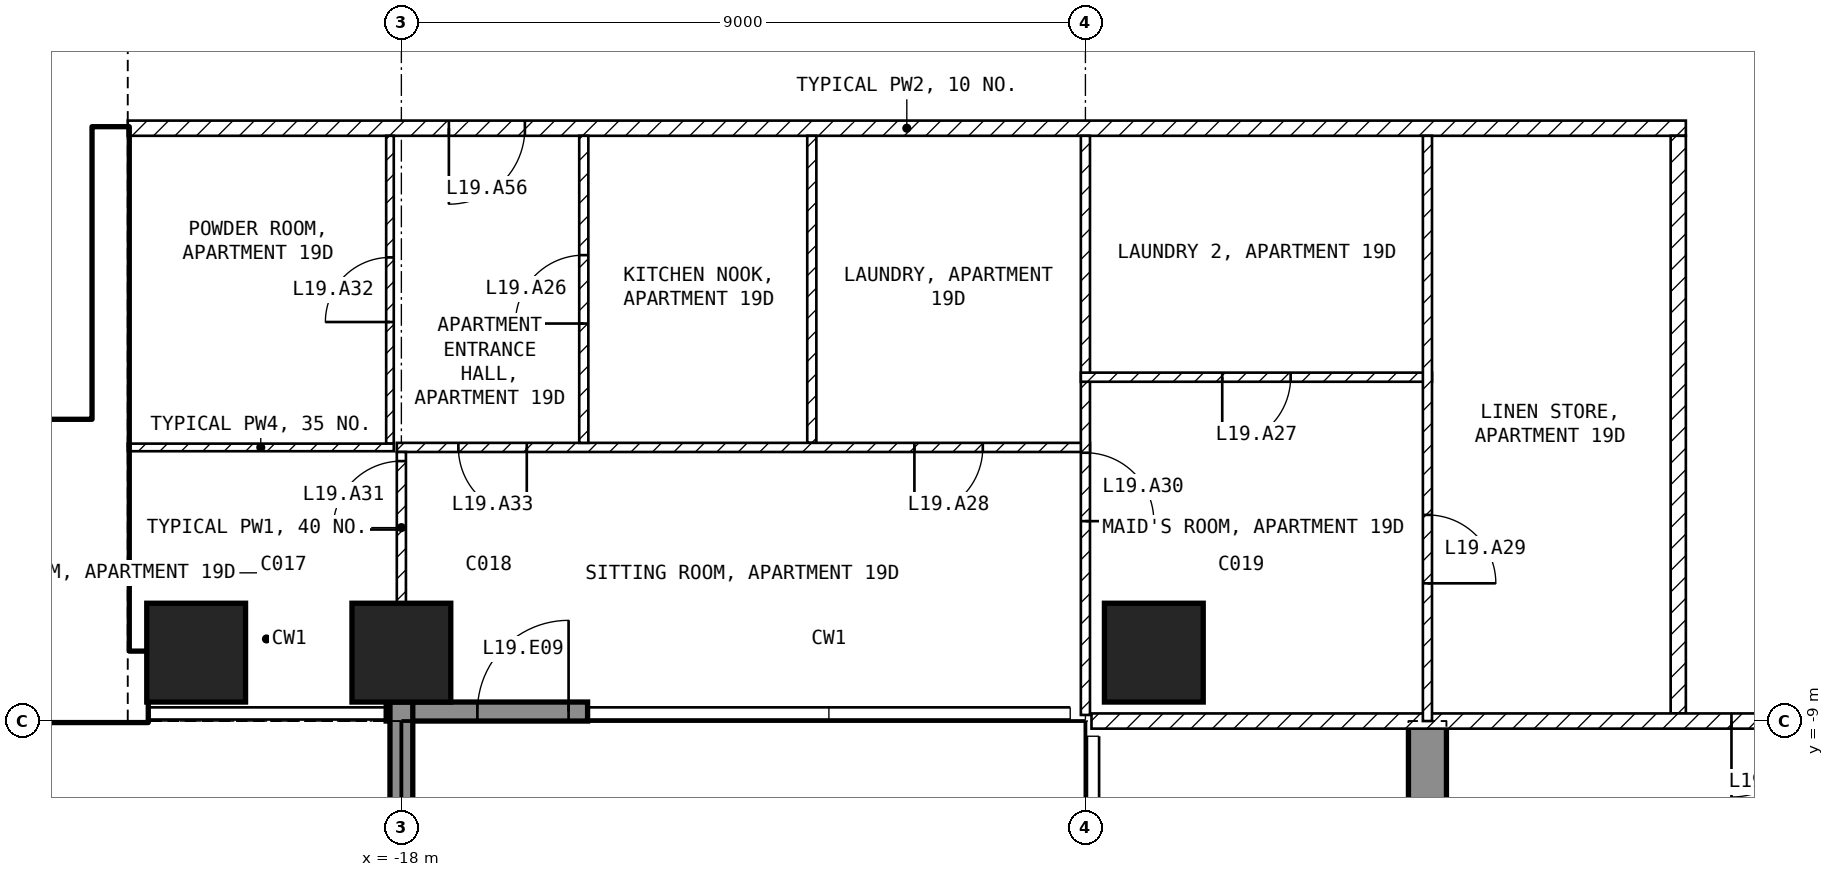
"""IFC4 building model, lengths in metres.
Left out: names, types, materials, properties, quantities, classifications, styles, units other than length and angle.
Written with IfcOpenShell. Run it as: python <this file> out.ifc"""

import sys

from ifc_helpers import new_model, si_unit, direction, frame, frame_2d, origin, origin_2d, place, context, subcontext, project, spatial, polyline, rectangle, outline, extrude, element, fill, save


model = new_model("IFC4")
c1 = context("Model", 3, precision=1e-05, world=origin(), true_north=direction((0.0, 1.0)))
c2 = subcontext(c1, "Body", "Model", "MODEL_VIEW")
j1 = project(units=[si_unit("LENGTHUNIT", "METRE"), si_unit("PLANEANGLEUNIT", "RADIAN")], contexts=[c1])
p1 = place(None, origin())
s1 = spatial("IfcSite", under=j1, at=p1, CompositionType="ELEMENT")
p2 = place(p1, origin())
s2 = spatial("IfcBuilding", under=s1, at=p2, CompositionType="ELEMENT")
p3 = place(p2, frame((0.0, 0.0, 85.5)))
s3 = spatial("IfcBuildingStorey", under=s2, at=p3, CompositionType="ELEMENT", Elevation=85.5)
for number, where, z_axis, x_axis in (
    (1, (-20.7, -8.1, -0.25), (0.0, 0.0, 1.0), (1.0, 0.0, 0.0)),
    (2, (-18.0, -8.1, -0.25), (0.0, 0.0, 1.0), (1.0, 0.0, 0.0)),
    (3, (-8.1, -8.1, -0.25), (0.0, 0.0, 1.0), (1.0, 0.0, 0.0)),
):
    element("IfcColumn", number, at=place(p3, frame(where, z_axis=z_axis, x_axis=x_axis)), inside=s3, PredefinedType="COLUMN", context=c2, shape_type="SweptSolid", body=[
        extrude(rectangle(XDim=1.3, YDim=1.3, at=origin_2d()), origin(), (0.0, 0.0, 1.0), 3.5),
    ])
p4 = place(p3, frame((-4.75, -25.45, -0.25), z_axis=(1.0, 0.0, 0.0), x_axis=(0.0, 1.0, 0.0)))
e4 = element("IfcWall", 4, at=p4, inside=s3, PredefinedType="SHEAR", context=c2, shape_type="SweptSolid", body=[
    extrude(outline(polyline([(0.0, 0.0), (4.15, 0.0), (4.15, 2.65), (6.55, 2.65), (6.55, 0.0), (11.95, 0.0), (11.95, 2.65), (14.35, 2.65), (14.35, 0.0), (16.45, 0.0), (16.45, 3.5), (0.0, 3.5), (0.0, 0.0)])), origin(), (0.0, 0.0, 1.0), 0.5),
])
p5 = place(p3, frame((-18.2, -8.875, 0.0), z_axis=(0.0, 0.0, 1.0), x_axis=(1.0, 0.0, 0.0)))
e5 = element("IfcWall", 5, at=p5, inside=s3, PredefinedType="SOLIDWALL", context=c2, shape_type="SweptSolid", body=[
    extrude(rectangle(XDim=2.65, YDim=0.25, at=frame_2d((1.325, 0.0))), origin(), (0.0, 0.0, 1.0), 3.25),
])
p6 = place(p5, frame((1.2, 0.0, 0.0)))
e6 = element("IfcOpeningElement", 6, at=p6, cuts=e5, PredefinedType="OPENING", context=c2, shape_type="SweptSolid", body=[
    extrude(rectangle(XDim=1.2, YDim=2.4, at=frame_2d((0.6, 1.2))), frame((0.0, 0.135, 0.0), z_axis=(0.0, -1.0, 0.0), x_axis=(1.0, 0.0, 0.0)), (0.0, 0.0, 1.0), 0.27),
])
p7 = place(p3, frame((-18.0, -8.75, 0.0), z_axis=(0.0, 0.0, 1.0), x_axis=(0.0, -1.0, 0.0)))
e7 = element("IfcWall", 7, at=p7, inside=s3, PredefinedType="SOLIDWALL", context=c2, shape_type="SweptSolid", body=[
    extrude(rectangle(XDim=2.95, YDim=0.3, at=frame_2d((1.475, 0.0))), origin(), (0.0, 0.0, 1.0), 3.25),
])
p8 = place(p3, frame((-32.4, -8.55, 0.0), z_axis=(0.0, 0.0, 1.0), x_axis=(1.0, 0.0, 0.0)))
e8 = element("IfcWall", 8, at=p8, inside=s3, PredefinedType="SHEAR", context=c2, shape_type="SweptSolid", body=[
    extrude(rectangle(XDim=11.05, YDim=0.9, at=frame_2d((5.525, 0.0))), origin(), (0.0, 0.0, 1.0), 3.25),
])
p9 = place(p3, frame((-21.825, -8.1, 0.0), z_axis=(0.0, 0.0, 1.0), x_axis=(0.0, 1.0, 0.0)))
e9 = element("IfcWall", 9, at=p9, inside=s3, PredefinedType="SHEAR", context=c2, shape_type="SweptSolid", body=[
    extrude(rectangle(XDim=6.9, YDim=0.45, at=frame_2d((3.45, 0.0))), origin(), (0.0, 0.0, 1.0), 3.25),
])
p10 = place(p3, frame((-28.35, -5.15, 0.0), z_axis=(0.0, 0.0, 1.0), x_axis=(1.0, 0.0, 0.0)))
e10 = element("IfcWall", 10, at=p10, inside=s3, PredefinedType="SOLIDWALL", context=c2, shape_type="SweptSolid", body=[
    extrude(rectangle(XDim=6.3, YDim=0.2, at=frame_2d((3.15, 0.0))), origin(), (0.0, 0.0, 1.0), 3.25),
])
p11 = place(p10, frame((5.1, 0.0, 0.0)))
e11 = element("IfcOpeningElement", 11, at=p11, cuts=e10, PredefinedType="OPENING", context=c2, shape_type="SweptSolid", body=[
    extrude(rectangle(XDim=1.0, YDim=2.1, at=frame_2d((0.5, 1.05))), frame((0.0, 0.11, 0.0), z_axis=(0.0, -1.0, 0.0), x_axis=(1.0, 0.0, 0.0)), (0.0, 0.0, 1.0), 0.22),
])
p12 = place(p3, frame((-1.1, -1.2, 0.0), z_axis=(0.0, 0.0, 1.0), x_axis=(-1.0, 0.0, 0.0)))
e12 = element("IfcWall", 12, at=p12, inside=s3, PredefinedType="PARTITIONING", context=c2, shape_type="SweptSolid", body=[
    extrude(rectangle(XDim=20.5, YDim=0.2, at=frame_2d((10.25, 0.0))), origin(), (0.0, 0.0, 1.0), 3.25),
])
p13 = place(p12, frame((15.275, 0.0, 0.0)))
e13 = element("IfcOpeningElement", 13, at=p13, cuts=e12, PredefinedType="OPENING", context=c2, shape_type="SweptSolid", body=[
    extrude(rectangle(XDim=1.0, YDim=2.1, at=frame_2d((0.5, 1.05))), frame((0.0, 0.11, 0.0), z_axis=(0.0, -1.0, 0.0), x_axis=(1.0, 0.0, 0.0)), (0.0, 0.0, 1.0), 0.22),
])
p14 = place(p3, frame((-1.2, -8.9, 0.0), z_axis=(0.0, 0.0, 1.0), x_axis=(0.0, 1.0, 0.0)))
e14 = element("IfcWall", 14, at=p14, inside=s3, PredefinedType="PARTITIONING", context=c2, shape_type="SweptSolid", body=[
    extrude(rectangle(XDim=7.6, YDim=0.2, at=frame_2d((3.8, 0.0))), origin(), (0.0, 0.0, 1.0), 3.25),
])
p15 = place(p3, frame((8.92, -9.0, 0.0), z_axis=(0.0, 0.0, 1.0), x_axis=(-1.0, 0.0, 0.0)))
e15 = element("IfcWall", 15, at=p15, inside=s3, PredefinedType="PARTITIONING", context=c2, shape_type="SweptSolid", body=[
    extrude(rectangle(XDim=17.84, YDim=0.2, at=frame_2d((8.92, 0.0))), origin(), (0.0, 0.0, 1.0), 3.25),
])
p16 = place(p15, frame((8.42, 0.0, 0.0)))
e16 = element("IfcOpeningElement", 16, at=p16, cuts=e15, PredefinedType="OPENING", context=c2, shape_type="SweptSolid", body=[
    extrude(rectangle(XDim=1.0, YDim=2.1, at=frame_2d((0.5, 1.05))), frame((0.0, 0.11, 0.0), z_axis=(0.0, -1.0, 0.0), x_axis=(1.0, 0.0, 0.0)), (0.0, 0.0, 1.0), 0.22),
])
p17 = place(p3, frame((-12.6, -5.34, 0.0), z_axis=(0.0, 0.0, 1.0), x_axis=(0.0, 1.0, 0.0)))
e17 = element("IfcWall", 17, at=p17, inside=s3, PredefinedType="PARTITIONING", context=c2, shape_type="SweptSolid", body=[
    extrude(rectangle(XDim=4.04, YDim=0.12, at=frame_2d((2.02, 0.0))), origin(), (0.0, 0.0, 1.0), 3.25),
])
p18 = place(p3, frame((-8.94, -5.4, 0.0), z_axis=(0.0, 0.0, 1.0), x_axis=(-1.0, 0.0, 0.0)))
e18 = element("IfcWall", 18, at=p18, inside=s3, PredefinedType="PARTITIONING", context=c2, shape_type="SweptSolid", body=[
    extrude(rectangle(XDim=9.12, YDim=0.12, at=frame_2d((4.56, 0.0))), origin(), (0.0, 0.0, 1.0), 3.25),
])
p19 = place(p18, frame((1.41, 0.0, 0.0)))
e19 = element("IfcOpeningElement", 19, at=p19, cuts=e18, PredefinedType="OPENING", context=c2, shape_type="SweptSolid", body=[
    extrude(rectangle(XDim=0.9, YDim=2.1, at=frame_2d((0.45, 1.05))), frame((0.0, 0.07, 0.0), z_axis=(0.0, -1.0, 0.0), x_axis=(1.0, 0.0, 0.0)), (0.0, 0.0, 1.0), 0.14),
])
p20 = place(p18, frame((7.41, 0.0, 0.0)))
e20 = element("IfcOpeningElement", 20, at=p20, cuts=e18, PredefinedType="OPENING", context=c2, shape_type="SweptSolid", body=[
    extrude(rectangle(XDim=0.9, YDim=2.1, at=frame_2d((0.45, 1.05))), frame((0.0, 0.07, 0.0), z_axis=(0.0, -1.0, 0.0), x_axis=(1.0, 0.0, 0.0)), (0.0, 0.0, 1.0), 0.14),
])
p21 = place(p3, frame((-9.0, -1.3, 0.0), z_axis=(0.0, 0.0, 1.0), x_axis=(0.0, -1.0, 0.0)))
e21 = element("IfcWall", 21, at=p21, inside=s3, PredefinedType="PARTITIONING", context=c2, shape_type="SweptSolid", body=[
    extrude(rectangle(XDim=7.62, YDim=0.12, at=frame_2d((3.81, 0.0))), origin(), (0.0, 0.0, 1.0), 3.25),
])
p22 = place(p21, frame((4.17, 0.0, 0.0)))
e22 = element("IfcOpeningElement", 22, at=p22, cuts=e21, PredefinedType="OPENING", context=c2, shape_type="SweptSolid", body=[
    extrude(rectangle(XDim=0.9, YDim=2.1, at=frame_2d((0.45, 1.05))), frame((0.0, 0.07, 0.0), z_axis=(0.0, -1.0, 0.0), x_axis=(1.0, 0.0, 0.0)), (0.0, 0.0, 1.0), 0.14),
])
p23 = place(p3, frame((-15.6, -5.34, 0.0), z_axis=(0.0, 0.0, 1.0), x_axis=(0.0, 1.0, 0.0)))
e23 = element("IfcWall", 23, at=p23, inside=s3, PredefinedType="PARTITIONING", context=c2, shape_type="SweptSolid", body=[
    extrude(rectangle(XDim=4.04, YDim=0.12, at=frame_2d((2.02, 0.0))), origin(), (0.0, 0.0, 1.0), 3.25),
])
p24 = place(p23, frame((1.57, 0.0, 0.0)))
e24 = element("IfcOpeningElement", 24, at=p24, cuts=e23, PredefinedType="OPENING", context=c2, shape_type="SweptSolid", body=[
    extrude(rectangle(XDim=0.9, YDim=2.1, at=frame_2d((0.45, 1.05))), frame((0.0, 0.07, 0.0), z_axis=(0.0, -1.0, 0.0), x_axis=(1.0, 0.0, 0.0)), (0.0, 0.0, 1.0), 0.14),
])
p25 = place(p3, frame((-18.15, -5.35, 0.0), z_axis=(0.0, 0.0, 1.0), x_axis=(0.0, 1.0, 0.0)))
e25 = element("IfcWall", 25, at=p25, inside=s3, PredefinedType="PARTITIONING", context=c2, shape_type="SweptSolid", body=[
    extrude(rectangle(XDim=4.05, YDim=0.1, at=frame_2d((2.025, 0.0))), origin(), (0.0, 0.0, 1.0), 2.346),
])
p26 = place(p25, frame((1.6, 0.0, 0.0)))
e26 = element("IfcOpeningElement", 26, at=p26, cuts=e25, PredefinedType="OPENING", context=c2, shape_type="SweptSolid", body=[
    extrude(rectangle(XDim=0.85, YDim=2.1, at=frame_2d((0.425, 1.05))), frame((0.0, 0.06, 0.0), z_axis=(0.0, -1.0, 0.0), x_axis=(1.0, 0.0, 0.0)), (0.0, 0.0, 1.0), 0.12),
])
p27 = place(p3, frame((-18.1, -5.4, 0.0), z_axis=(0.0, 0.0, 1.0), x_axis=(-1.0, 0.0, 0.0)))
e27 = element("IfcWall", 27, at=p27, inside=s3, PredefinedType="PARTITIONING", context=c2, shape_type="SweptSolid", body=[
    extrude(rectangle(XDim=3.5, YDim=0.1, at=frame_2d((1.75, 0.0))), origin(), (0.0, 0.0, 1.0), 3.25),
])
p28 = place(p3, frame((-18.0, -7.45, 0.0), z_axis=(0.0, 0.0, 1.0), x_axis=(0.0, 1.0, 0.0)))
e28 = element("IfcWall", 28, at=p28, inside=s3, PredefinedType="PARTITIONING", context=c2, shape_type="SweptSolid", body=[
    extrude(rectangle(XDim=1.99, YDim=0.12, at=frame_2d((0.995, 0.0))), origin(), (0.0, 0.0, 1.0), 2.346),
])
p29 = place(p28, frame((0.97, 0.0, 0.0)))
e29 = element("IfcOpeningElement", 29, at=p29, cuts=e28, PredefinedType="OPENING", context=c2, shape_type="SweptSolid", body=[
    extrude(rectangle(XDim=0.9, YDim=2.1, at=frame_2d((0.45, 1.05))), frame((0.0, 0.07, 0.0), z_axis=(0.0, -1.0, 0.0), x_axis=(1.0, 0.0, 0.0)), (0.0, 0.0, 1.0), 0.14),
])
p30 = place(p3, frame((-4.44, -4.476, 0.0), z_axis=(0.0, 0.0, 1.0), x_axis=(-1.0, 0.0, 0.0)))
e30 = element("IfcWall", 30, at=p30, inside=s3, PredefinedType="PARTITIONING", context=c2, shape_type="SweptSolid", body=[
    extrude(rectangle(XDim=4.62, YDim=0.12, at=frame_2d((2.31, 0.0))), origin(), (0.0, 0.0, 1.0), 3.25),
])
p31 = place(p30, frame((1.86, 0.0, 0.0)))
e31 = element("IfcOpeningElement", 31, at=p31, cuts=e30, PredefinedType="OPENING", context=c2, shape_type="SweptSolid", body=[
    extrude(rectangle(XDim=0.9, YDim=2.1, at=frame_2d((0.45, 1.05))), frame((0.0, 0.07, 0.0), z_axis=(0.0, -1.0, 0.0), x_axis=(1.0, 0.0, 0.0)), (0.0, 0.0, 1.0), 0.14),
])
p32 = place(p3, frame((-4.5, -1.3, 0.0), z_axis=(0.0, 0.0, 1.0), x_axis=(0.0, -1.0, 0.0)))
e32 = element("IfcWall", 32, at=p32, inside=s3, PredefinedType="PARTITIONING", context=c2, shape_type="SweptSolid", body=[
    extrude(rectangle(XDim=7.7, YDim=0.12, at=frame_2d((3.85, 0.0))), origin(), (0.0, 0.0, 1.0), 3.25),
])
p33 = place(p32, frame((4.988, 0.0, 0.0)))
e33 = element("IfcOpeningElement", 33, at=p33, cuts=e32, PredefinedType="OPENING", context=c2, shape_type="SweptSolid", body=[
    extrude(rectangle(XDim=0.9, YDim=2.1, at=frame_2d((0.45, 1.05))), frame((0.0, 0.07, 0.0), z_axis=(0.0, -1.0, 0.0), x_axis=(1.0, 0.0, 0.0)), (0.0, 0.0, 1.0), 0.14),
])
p34 = place(p6, origin())
e34 = element("IfcDoor", 34, at=p34, inside=s3, OperationType="SINGLE_SWING_RIGHT", PredefinedType="DOOR", context=c2, shape_type="SweptSolid", body=[
    extrude(rectangle(XDim=1.2, YDim=2.4, at=frame_2d((0.6, 1.2))), frame((0.0, 0.025, 0.0), z_axis=(0.0, -1.0, 0.0), x_axis=(1.0, 0.0, 0.0)), (0.0, 0.0, 1.0), 0.05),
])
fill(e6, e34)
p35 = place(p11, origin())
e35 = element("IfcDoor", 35, at=p35, inside=s3, OperationType="SINGLE_SWING_LEFT", PredefinedType="DOOR", context=c2, shape_type="SweptSolid", body=[
    extrude(rectangle(XDim=1.0, YDim=2.1, at=frame_2d((0.5, 1.05))), frame((0.0, 0.025, 0.0), z_axis=(0.0, -1.0, 0.0), x_axis=(1.0, 0.0, 0.0)), (0.0, 0.0, 1.0), 0.05),
])
fill(e11, e35)
p36 = place(p24, origin())
e36 = element("IfcDoor", 36, at=p36, inside=s3, OperationType="SINGLE_SWING_LEFT", PredefinedType="DOOR", context=c2, shape_type="SweptSolid", body=[
    extrude(rectangle(XDim=0.9, YDim=2.1, at=frame_2d((0.45, 1.05))), frame((0.0, 0.025, 0.0), z_axis=(0.0, -1.0, 0.0), x_axis=(1.0, 0.0, 0.0)), (0.0, 0.0, 1.0), 0.05),
])
fill(e24, e36)
p37 = place(p31, origin())
e37 = element("IfcDoor", 37, at=p37, inside=s3, OperationType="SINGLE_SWING_RIGHT", PredefinedType="DOOR", context=c2, shape_type="SweptSolid", body=[
    extrude(rectangle(XDim=0.9, YDim=2.1, at=frame_2d((0.45, 1.05))), frame((0.0, 0.025, 0.0), z_axis=(0.0, -1.0, 0.0), x_axis=(1.0, 0.0, 0.0)), (0.0, 0.0, 1.0), 0.05),
])
fill(e31, e37)
p38 = place(p19, origin())
e38 = element("IfcDoor", 38, at=p38, inside=s3, OperationType="SINGLE_SWING_RIGHT", PredefinedType="DOOR", context=c2, shape_type="SweptSolid", body=[
    extrude(rectangle(XDim=0.9, YDim=2.1, at=frame_2d((0.45, 1.05))), frame((0.0, 0.025, 0.0), z_axis=(0.0, -1.0, 0.0), x_axis=(1.0, 0.0, 0.0)), (0.0, 0.0, 1.0), 0.05),
])
fill(e19, e38)
p39 = place(p33, origin())
e39 = element("IfcDoor", 39, at=p39, inside=s3, OperationType="SINGLE_SWING_RIGHT", PredefinedType="DOOR", context=c2, shape_type="SweptSolid", body=[
    extrude(rectangle(XDim=0.9, YDim=2.1, at=frame_2d((0.45, 1.05))), frame((0.0, 0.025, 0.0), z_axis=(0.0, -1.0, 0.0), x_axis=(1.0, 0.0, 0.0)), (0.0, 0.0, 1.0), 0.05),
])
fill(e33, e39)
p40 = place(p22, origin())
e40 = element("IfcDoor", 40, at=p40, inside=s3, OperationType="SINGLE_SWING_RIGHT", PredefinedType="DOOR", context=c2, shape_type="SweptSolid", body=[
    extrude(rectangle(XDim=0.9, YDim=2.1, at=frame_2d((0.45, 1.05))), frame((0.0, 0.025, 0.0), z_axis=(0.0, -1.0, 0.0), x_axis=(1.0, 0.0, 0.0)), (0.0, 0.0, 1.0), 0.05),
])
fill(e22, e40)
p41 = place(p29, origin())
e41 = element("IfcDoor", 41, at=p41, inside=s3, OperationType="SINGLE_SWING_LEFT", PredefinedType="DOOR", context=c2, shape_type="SweptSolid", body=[
    extrude(rectangle(XDim=0.9, YDim=2.1, at=frame_2d((0.45, 1.05))), frame((0.0, 0.025, 0.0), z_axis=(0.0, -1.0, 0.0), x_axis=(1.0, 0.0, 0.0)), (0.0, 0.0, 1.0), 0.05),
])
fill(e29, e41)
p42 = place(p26, origin())
e42 = element("IfcDoor", 42, at=p42, inside=s3, OperationType="SINGLE_SWING_LEFT", PredefinedType="DOOR", context=c2, shape_type="SweptSolid", body=[
    extrude(rectangle(XDim=0.85, YDim=2.1, at=frame_2d((0.425, 1.05))), frame((0.0, 0.025, 0.0), z_axis=(0.0, -1.0, 0.0), x_axis=(1.0, 0.0, 0.0)), (0.0, 0.0, 1.0), 0.05),
])
fill(e26, e42)
p43 = place(p20, origin())
e43 = element("IfcDoor", 43, at=p43, inside=s3, OperationType="SINGLE_SWING_LEFT", PredefinedType="DOOR", context=c2, shape_type="SweptSolid", body=[
    extrude(rectangle(XDim=0.9, YDim=2.1, at=frame_2d((0.45, 1.05))), frame((0.0, 0.025, 0.0), z_axis=(0.0, -1.0, 0.0), x_axis=(1.0, 0.0, 0.0)), (0.0, 0.0, 1.0), 0.05),
])
fill(e20, e43)
p44 = place(p16, origin())
e44 = element("IfcDoor", 44, at=p44, inside=s3, OperationType="SINGLE_SWING_RIGHT", PredefinedType="DOOR", context=c2, shape_type="SweptSolid", body=[
    extrude(rectangle(XDim=1.0, YDim=2.1, at=frame_2d((0.5, 1.05))), frame((0.0, 0.025, 0.0), z_axis=(0.0, -1.0, 0.0), x_axis=(1.0, 0.0, 0.0)), (0.0, 0.0, 1.0), 0.05),
])
fill(e16, e44)
p45 = place(p13, origin())
e45 = element("IfcDoor", 45, at=p45, inside=s3, OperationType="SINGLE_SWING_RIGHT", PredefinedType="DOOR", context=c2, shape_type="SweptSolid", body=[
    extrude(rectangle(XDim=1.0, YDim=2.1, at=frame_2d((0.5, 1.05))), frame((0.0, 0.025, 0.0), z_axis=(0.0, -1.0, 0.0), x_axis=(1.0, 0.0, 0.0)), (0.0, 0.0, 1.0), 0.05),
])
fill(e13, e45)
save(model, sys.argv[1])
